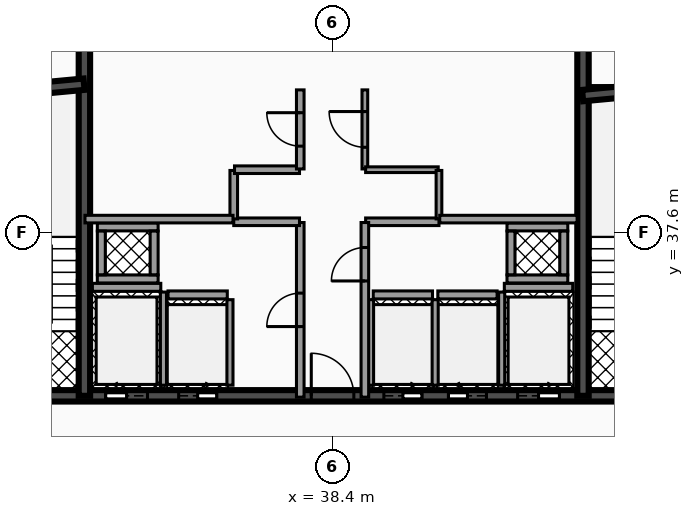
"""IFC4 building model, lengths in metres.
Left out: names, types, materials, properties, quantities, classifications, styles, units other than length and angle.
Written with IfcOpenShell. Run it as: python <this file> out.ifc"""

import sys

from ifc_helpers import new_model, si_unit, direction, frame, frame_2d, origin, place, context, subcontext, project, spatial, rectangle, extrude, element, fill, save


model = new_model("IFC4")
c1 = context("Model", 3, precision=1e-05, world=origin(), true_north=direction((0.0, 1.0)))
c2 = subcontext(c1, "Body", "Model", "MODEL_VIEW")
j1 = project(units=[si_unit("LENGTHUNIT", "METRE"), si_unit("PLANEANGLEUNIT", "RADIAN")], contexts=[c1])
p1 = place(None, origin())
s1 = spatial("IfcSite", under=j1, at=p1, CompositionType="ELEMENT")
p2 = place(p1, origin())
s2 = spatial("IfcBuilding", under=s1, at=p2, CompositionType="ELEMENT")
p3 = place(p2, frame((0.0, 0.0, 285.6)))
s3 = spatial("IfcBuildingStorey", under=s2, at=p3, CompositionType="ELEMENT", Elevation=285.6)
p4 = place(p3, frame((28.5, 33.3, 0.0), z_axis=(0.0, 0.0, 1.0), x_axis=(1.0, 0.0, 0.0)))
e1 = element("IfcWall", 1, at=p4, inside=s3, PredefinedType="SHEAR", context=c2, shape_type="SweptSolid", body=[
    extrude(rectangle(XDim=19.86, YDim=0.3, at=frame_2d((9.93, 0.0))), origin(), (0.0, 0.0, 1.0), 3.18),
])
p5 = place(p4, frame((3.93, 0.0, 0.0)))
e2 = element("IfcOpeningElement", 2, at=p5, cuts=e1, PredefinedType="OPENING", context=c2, shape_type="SweptSolid", body=[
    extrude(rectangle(XDim=1.1, YDim=2.15, at=frame_2d((0.55, 1.075))), frame((0.0, 0.16, 0.0), z_axis=(0.0, -1.0, 0.0), x_axis=(1.0, 0.0, 0.0)), (0.0, 0.0, 1.0), 0.32),
])
p6 = place(p4, frame((14.77, 0.0, 0.0)))
e3 = element("IfcOpeningElement", 3, at=p6, cuts=e1, PredefinedType="OPENING", context=c2, shape_type="SweptSolid", body=[
    extrude(rectangle(XDim=1.1, YDim=2.15, at=frame_2d((0.55, 1.075))), frame((0.0, 0.16, 0.0), z_axis=(0.0, -1.0, 0.0), x_axis=(1.0, 0.0, 0.0)), (0.0, 0.0, 1.0), 0.32),
])
p7 = place(p4, frame((11.25, 0.0, 0.0)))
e4 = element("IfcOpeningElement", 4, at=p7, cuts=e1, PredefinedType="OPENING", context=c2, shape_type="SweptSolid", body=[
    extrude(rectangle(XDim=1.0, YDim=2.1, at=frame_2d((0.5, 1.05))), frame((0.0, 0.16, 0.0), z_axis=(0.0, -1.0, 0.0), x_axis=(1.0, 0.0, 0.0)), (0.0, 0.0, 1.0), 0.32),
])
p8 = place(p4, frame((12.95, 0.0, 0.0)))
e5 = element("IfcOpeningElement", 5, at=p8, cuts=e1, PredefinedType="OPENING", context=c2, shape_type="SweptSolid", body=[
    extrude(rectangle(XDim=1.0, YDim=2.1, at=frame_2d((0.5, 1.05))), frame((0.0, 0.16, 0.0), z_axis=(0.0, -1.0, 0.0), x_axis=(1.0, 0.0, 0.0)), (0.0, 0.0, 1.0), 0.32),
])
p9 = place(p4, frame((5.85, 0.0, 0.0)))
e6 = element("IfcOpeningElement", 6, at=p9, cuts=e1, PredefinedType="OPENING", context=c2, shape_type="SweptSolid", body=[
    extrude(rectangle(XDim=1.0, YDim=2.1, at=frame_2d((0.5, 1.05))), frame((0.0, 0.16, 0.0), z_axis=(0.0, -1.0, 0.0), x_axis=(1.0, 0.0, 0.0)), (0.0, 0.0, 1.0), 0.32),
])
p10 = place(p4, frame((1.21, 0.0, 0.0)))
e7 = element("IfcOpeningElement", 7, at=p10, cuts=e1, PredefinedType="OPENING", context=c2, shape_type="SweptSolid", body=[
    extrude(rectangle(XDim=1.1, YDim=2.2, at=frame_2d((0.55, 1.1))), frame((0.0, 0.16, 0.0), z_axis=(0.0, -1.0, 0.0), x_axis=(1.0, 0.0, 0.0)), (0.0, 0.0, 1.0), 0.32),
])
p11 = place(p4, frame((9.34, 0.0, 0.0)))
e8 = element("IfcOpeningElement", 8, at=p11, cuts=e1, PredefinedType="OPENING", context=c2, shape_type="SweptSolid", body=[
    extrude(rectangle(XDim=1.12, YDim=2.05, at=frame_2d((0.56, 1.025))), frame((0.0, 0.16, 0.0), z_axis=(0.0, -1.0, 0.0), x_axis=(1.0, 0.0, 0.0)), (0.0, 0.0, 1.0), 0.32),
])
p12 = place(p4, frame((17.55, 0.0, 0.0)))
e9 = element("IfcOpeningElement", 9, at=p12, cuts=e1, PredefinedType="OPENING", context=c2, shape_type="SweptSolid", body=[
    extrude(rectangle(XDim=1.1, YDim=2.2, at=frame_2d((0.55, 1.1))), frame((0.0, 0.16, 0.0), z_axis=(0.0, -1.0, 0.0), x_axis=(1.0, 0.0, 0.0)), (0.0, 0.0, 1.0), 0.32),
])
for number, where, z_axis, x_axis in (
    (10, (31.87, 33.3, 0.0), (0.0, 0.0, 1.0), (0.0, 1.0, 0.0)),
    (11, (44.99, 33.3, 0.0), (0.0, 0.0, 1.0), (0.0, 1.0, 0.0)),
):
    element("IfcWall", number, at=place(p3, frame(where, z_axis=z_axis, x_axis=x_axis)), inside=s3, PredefinedType="SHEAR", context=c2, shape_type="SweptSolid", body=[
        extrude(rectangle(XDim=10.1, YDim=0.3, at=frame_2d((5.05, 0.0))), origin(), (0.0, 0.0, 1.0), 3.18),
    ])
p13 = place(p3, frame((28.64, 41.2, 0.0), z_axis=(0.0, 0.0, 1.0), x_axis=(0.995687118776, 0.092774789157, 0.0)))
e12 = element("IfcWall", 12, at=p13, inside=s3, PredefinedType="SHEAR", context=c2, shape_type="SweptSolid", body=[
    extrude(rectangle(XDim=3.234, YDim=0.3, at=frame_2d((1.617, 0.0))), origin(), (0.0, 0.0, 1.0), 3.18),
])
p14 = place(p3, frame((44.98, 41.2, 0.0), z_axis=(0.0, 0.0, 1.0), x_axis=(0.995686468965, 0.09278176286, 0.0)))
e13 = element("IfcWall", 13, at=p14, inside=s3, PredefinedType="SHEAR", context=c2, shape_type="SweptSolid", body=[
    extrude(rectangle(XDim=3.234, YDim=0.3, at=frame_2d((1.617, 0.0))), origin(), (0.0, 0.0, 1.0), 3.18),
])
p15 = place(p3, frame((32.08, 36.155, 0.0), z_axis=(0.0, 0.0, 1.0), x_axis=(1.0, 0.0, 0.0)))
e14 = element("IfcWall", 14, at=p15, inside=s3, PredefinedType="SOLIDWALL", context=c2, shape_type="SweptSolid", body=[
    extrude(rectangle(XDim=1.8, YDim=0.21, at=frame_2d((0.9, 0.0))), origin(), (0.0, 0.0, 1.0), 3.18),
])
p16 = place(p3, frame((33.95, 33.58, 0.0), z_axis=(0.0, 0.0, 1.0), x_axis=(0.0, 1.0, 0.0)))
e15 = element("IfcWall", 15, at=p16, inside=s3, PredefinedType="SOLIDWALL", context=c2, shape_type="SweptSolid", body=[
    extrude(rectangle(XDim=2.45, YDim=0.16, at=frame_2d((1.225, 0.0))), origin(), (0.0, 0.0, 1.0), 3.18),
])
p17 = place(p3, frame((42.92, 36.155, 0.0), z_axis=(0.0, 0.0, 1.0), x_axis=(1.0, 0.0, 0.0)))
e16 = element("IfcWall", 16, at=p17, inside=s3, PredefinedType="SOLIDWALL", context=c2, shape_type="SweptSolid", body=[
    extrude(rectangle(XDim=1.8, YDim=0.21, at=frame_2d((0.9, 0.0))), origin(), (0.0, 0.0, 1.0), 3.18),
])
p18 = place(p3, frame((42.85, 33.58, 0.0), z_axis=(0.0, 0.0, 1.0), x_axis=(0.0, 1.0, 0.0)))
e17 = element("IfcWall", 17, at=p18, inside=s3, PredefinedType="SOLIDWALL", context=c2, shape_type="SweptSolid", body=[
    extrude(rectangle(XDim=2.45, YDim=0.16, at=frame_2d((1.225, 0.0))), origin(), (0.0, 0.0, 1.0), 3.18),
])
p19 = place(p3, frame((39.47, 35.955, 0.0), z_axis=(0.0, 0.0, 1.0), x_axis=(1.0, 0.0, 0.0)))
e18 = element("IfcWall", 18, at=p19, inside=s3, PredefinedType="SOLIDWALL", context=c2, shape_type="SweptSolid", body=[
    extrude(rectangle(XDim=1.56, YDim=0.21, at=frame_2d((0.78, 0.0))), origin(), (0.0, 0.0, 1.0), 3.18),
])
for number, where, z_axis, x_axis in (
    (19, (39.4, 33.58, 0.0), (0.0, 0.0, 1.0), (0.0, 1.0, 0.0)),
    (20, (41.1, 33.58, 0.0), (0.0, 0.0, 1.0), (0.0, 1.0, 0.0)),
):
    element("IfcWall", number, at=place(p3, frame(where, z_axis=z_axis, x_axis=x_axis)), inside=s3, PredefinedType="SOLIDWALL", context=c2, shape_type="SweptSolid", body=[
        extrude(rectangle(XDim=2.25, YDim=0.16, at=frame_2d((1.125, 0.0))), origin(), (0.0, 0.0, 1.0), 3.18),
    ])
p20 = place(p3, frame((41.17, 35.955, 0.0), z_axis=(0.0, 0.0, 1.0), x_axis=(1.0, 0.0, 0.0)))
e21 = element("IfcWall", 21, at=p20, inside=s3, PredefinedType="SOLIDWALL", context=c2, shape_type="SweptSolid", body=[
    extrude(rectangle(XDim=1.56, YDim=0.21, at=frame_2d((0.78, 0.0))), origin(), (0.0, 0.0, 1.0), 3.18),
])
p21 = place(p3, frame((34.07, 35.955, 0.0), z_axis=(0.0, 0.0, 1.0), x_axis=(1.0, 0.0, 0.0)))
e22 = element("IfcWall", 22, at=p21, inside=s3, PredefinedType="SOLIDWALL", context=c2, shape_type="SweptSolid", body=[
    extrude(rectangle(XDim=1.56, YDim=0.21, at=frame_2d((0.78, 0.0))), origin(), (0.0, 0.0, 1.0), 3.18),
])
p22 = place(p3, frame((35.7, 33.58, 0.0), z_axis=(0.0, 0.0, 1.0), x_axis=(0.0, 1.0, 0.0)))
e23 = element("IfcWall", 23, at=p22, inside=s3, PredefinedType="SOLIDWALL", context=c2, shape_type="SweptSolid", body=[
    extrude(rectangle(XDim=2.25, YDim=0.16, at=frame_2d((1.125, 0.0))), origin(), (0.0, 0.0, 1.0), 3.18),
])
for number, where, z_axis, x_axis in (
    (24, (32.21, 36.375, 0.0), (0.0, 0.0, 1.0), (1.0, 0.0, 0.0)),
    (25, (32.21, 37.745, 0.0), (0.0, 0.0, 1.0), (1.0, 0.0, 0.0)),
):
    element("IfcWall", number, at=place(p3, frame(where, z_axis=z_axis, x_axis=x_axis)), inside=s3, PredefinedType="SOLIDWALL", context=c2, shape_type="SweptSolid", body=[
        extrude(rectangle(XDim=1.6, YDim=0.21, at=frame_2d((0.8, 0.0))), origin(), (0.0, 0.0, 1.0), 3.18),
    ])
for number, where, z_axis, x_axis in (
    (26, (32.315, 36.485, 0.0), (0.0, 0.0, 1.0), (0.0, 1.0, 0.0)),
    (27, (33.705, 36.485, 0.0), (0.0, 0.0, 1.0), (0.0, 1.0, 0.0)),
):
    element("IfcWall", number, at=place(p3, frame(where, z_axis=z_axis, x_axis=x_axis)), inside=s3, PredefinedType="SOLIDWALL", context=c2, shape_type="SweptSolid", body=[
        extrude(rectangle(XDim=1.15, YDim=0.21, at=frame_2d((0.575, 0.0))), origin(), (0.0, 0.0, 1.0), 3.18),
    ])
for number, where, z_axis, x_axis in (
    (28, (42.99, 36.375, 0.0), (0.0, 0.0, 1.0), (1.0, 0.0, 0.0)),
    (29, (42.99, 37.745, 0.0), (0.0, 0.0, 1.0), (1.0, 0.0, 0.0)),
):
    element("IfcWall", number, at=place(p3, frame(where, z_axis=z_axis, x_axis=x_axis)), inside=s3, PredefinedType="SOLIDWALL", context=c2, shape_type="SweptSolid", body=[
        extrude(rectangle(XDim=1.6, YDim=0.21, at=frame_2d((0.8, 0.0))), origin(), (0.0, 0.0, 1.0), 3.18),
    ])
for number, where, z_axis, x_axis in (
    (30, (43.095, 36.485, 0.0), (0.0, 0.0, 1.0), (0.0, 1.0, 0.0)),
    (31, (44.485, 36.485, 0.0), (0.0, 0.0, 1.0), (0.0, 1.0, 0.0)),
):
    element("IfcWall", number, at=place(p3, frame(where, z_axis=z_axis, x_axis=x_axis)), inside=s3, PredefinedType="SOLIDWALL", context=c2, shape_type="SweptSolid", body=[
        extrude(rectangle(XDim=1.15, YDim=0.21, at=frame_2d((0.575, 0.0))), origin(), (0.0, 0.0, 1.0), 3.18),
    ])
p23 = place(p3, frame((37.55, 33.265, 0.0), z_axis=(0.0, 0.0, 1.0), x_axis=(0.0, 1.0, 0.0)))
e32 = element("IfcWall", 32, at=p23, inside=s3, PredefinedType="PARTITIONING", context=c2, shape_type="SweptSolid", body=[
    extrude(rectangle(XDim=4.595, YDim=0.2, at=frame_2d((2.298, 0.0))), origin(), (0.0, 0.0, 1.0), 2.235),
])
p24 = place(p23, frame((1.857, 0.0, 0.0)))
e33 = element("IfcOpeningElement", 33, at=p24, cuts=e32, PredefinedType="OPENING", context=c2, shape_type="SweptSolid", body=[
    extrude(rectangle(XDim=0.88, YDim=2.05, at=frame_2d((0.44, 1.025))), frame((0.0, 0.11, 0.0), z_axis=(0.0, -1.0, 0.0), x_axis=(1.0, 0.0, 0.0)), (0.0, 0.0, 1.0), 0.22),
])
p25 = place(p3, frame((35.8, 37.88, 0.0), z_axis=(0.0, 0.0, 1.0), x_axis=(1.0, 0.0, 0.0)))
e34 = element("IfcWall", 34, at=p25, inside=s3, PredefinedType="PARTITIONING", context=c2, shape_type="SweptSolid", body=[
    extrude(rectangle(XDim=1.73, YDim=0.2, at=frame_2d((0.865, 0.0))), origin(), (0.0, 0.0, 1.0), 2.235),
])
p26 = place(p3, frame((35.8, 37.955, 0.0), z_axis=(0.0, 0.0, 1.0), x_axis=(0.0, 1.0, 0.0)))
e35 = element("IfcWall", 35, at=p26, inside=s3, PredefinedType="PARTITIONING", context=c2, shape_type="SweptSolid", body=[
    extrude(rectangle(XDim=1.275, YDim=0.2, at=frame_2d((0.637, 0.0))), origin(), (0.0, 0.0, 1.0), 2.235),
])
p27 = place(p3, frame((35.82, 39.25, 0.0), z_axis=(0.0, 0.0, 1.0), x_axis=(1.0, 0.0, 0.0)))
e36 = element("IfcWall", 36, at=p27, inside=s3, PredefinedType="PARTITIONING", context=c2, shape_type="SweptSolid", body=[
    extrude(rectangle(XDim=1.71, YDim=0.2, at=frame_2d((0.855, 0.0))), origin(), (0.0, 0.0, 1.0), 2.235),
])
p28 = place(p3, frame((37.55, 39.27, 0.0), z_axis=(0.0, 0.0, 1.0), x_axis=(0.0, 1.0, 0.0)))
e37 = element("IfcWall", 37, at=p28, inside=s3, PredefinedType="PARTITIONING", context=c2, shape_type="SweptSolid", body=[
    extrude(rectangle(XDim=2.08, YDim=0.2, at=frame_2d((1.04, 0.0))), origin(), (0.0, 0.0, 1.0), 2.235),
])
p29 = place(p28, frame((0.6, 0.0, 0.0)))
e38 = element("IfcOpeningElement", 38, at=p29, cuts=e37, PredefinedType="OPENING", context=c2, shape_type="SweptSolid", body=[
    extrude(rectangle(XDim=0.88, YDim=2.05, at=frame_2d((0.44, 1.025))), frame((0.0, 0.11, 0.0), z_axis=(0.0, -1.0, 0.0), x_axis=(1.0, 0.0, 0.0)), (0.0, 0.0, 1.0), 0.22),
])
p30 = place(p3, frame((39.27, 37.88, 0.0), z_axis=(0.0, 0.0, 1.0), x_axis=(1.0, 0.0, 0.0)))
e39 = element("IfcWall", 39, at=p30, inside=s3, PredefinedType="PARTITIONING", context=c2, shape_type="SweptSolid", body=[
    extrude(rectangle(XDim=1.93, YDim=0.2, at=frame_2d((0.965, 0.0))), origin(), (0.0, 0.0, 1.0), 2.235),
])
p31 = place(p3, frame((39.25, 33.265, 0.0), z_axis=(0.0, 0.0, 1.0), x_axis=(0.0, 1.0, 0.0)))
e40 = element("IfcWall", 40, at=p31, inside=s3, PredefinedType="PARTITIONING", context=c2, shape_type="SweptSolid", body=[
    extrude(rectangle(XDim=4.595, YDim=0.2, at=frame_2d((2.298, 0.0))), origin(), (0.0, 0.0, 1.0), 2.235),
])
p32 = place(p31, frame((3.058, 0.0, 0.0)))
e41 = element("IfcOpeningElement", 41, at=p32, cuts=e40, PredefinedType="OPENING", context=c2, shape_type="SweptSolid", body=[
    extrude(rectangle(XDim=0.88, YDim=2.05, at=frame_2d((0.44, 1.025))), frame((0.0, 0.11, 0.0), z_axis=(0.0, -1.0, 0.0), x_axis=(1.0, 0.0, 0.0)), (0.0, 0.0, 1.0), 0.22),
])
p33 = place(p3, frame((39.25, 39.27, 0.0), z_axis=(0.0, 0.0, 1.0), x_axis=(0.0, 1.0, 0.0)))
e42 = element("IfcWall", 42, at=p33, inside=s3, PredefinedType="PARTITIONING", context=c2, shape_type="SweptSolid", body=[
    extrude(rectangle(XDim=2.08, YDim=0.15, at=frame_2d((1.04, 0.0))), origin(), (0.0, 0.0, 1.0), 2.235),
])
p34 = place(p33, frame((0.57, 0.0, 0.0)))
e43 = element("IfcOpeningElement", 43, at=p34, cuts=e42, PredefinedType="OPENING", context=c2, shape_type="SweptSolid", body=[
    extrude(rectangle(XDim=0.94, YDim=2.05, at=frame_2d((0.47, 1.025))), frame((0.0, 0.085, 0.0), z_axis=(0.0, -1.0, 0.0), x_axis=(1.0, 0.0, 0.0)), (0.0, 0.0, 1.0), 0.17),
])
p35 = place(p3, frame((39.27, 39.25, 0.0), z_axis=(0.0, 0.0, 1.0), x_axis=(1.0, 0.0, 0.0)))
e44 = element("IfcWall", 44, at=p35, inside=s3, PredefinedType="PARTITIONING", context=c2, shape_type="SweptSolid", body=[
    extrude(rectangle(XDim=1.91, YDim=0.15, at=frame_2d((0.955, 0.0))), origin(), (0.0, 0.0, 1.0), 2.235),
])
p36 = place(p3, frame((41.2, 37.955, 0.0), z_axis=(0.0, 0.0, 1.0), x_axis=(0.0, 1.0, 0.0)))
e45 = element("IfcWall", 45, at=p36, inside=s3, PredefinedType="PARTITIONING", context=c2, shape_type="SweptSolid", body=[
    extrude(rectangle(XDim=1.275, YDim=0.15, at=frame_2d((0.637, 0.0))), origin(), (0.0, 0.0, 1.0), 2.235),
])
p37 = place(p3, frame((31.885, 37.95, 0.0), z_axis=(0.0, 0.0, 1.0), x_axis=(1.0, 0.0, 0.0)))
e46 = element("IfcWall", 46, at=p37, inside=s3, PredefinedType="PARTITIONING", context=c2, shape_type="SweptSolid", body=[
    extrude(rectangle(XDim=3.895, YDim=0.2, at=frame_2d((1.948, 0.0))), origin(), (0.0, 0.0, 1.0), 2.235),
])
p38 = place(p3, frame((41.22, 37.95, 0.0), z_axis=(0.0, 0.0, 1.0), x_axis=(1.0, 0.0, 0.0)))
e47 = element("IfcWall", 47, at=p38, inside=s3, PredefinedType="PARTITIONING", context=c2, shape_type="SweptSolid", body=[
    extrude(rectangle(XDim=3.615, YDim=0.2, at=frame_2d((1.808, 0.0))), origin(), (0.0, 0.0, 1.0), 2.235),
])
p39 = place(p5, origin())
e48 = element("IfcDoor", 48, at=p39, inside=s3, OperationType="SLIDING_TO_LEFT", PredefinedType="DOOR", context=c2, shape_type="SweptSolid", body=[
    extrude(rectangle(XDim=1.1, YDim=2.15, at=frame_2d((0.55, 1.075))), frame((0.0, 0.025, 0.0), z_axis=(0.0, -1.0, 0.0), x_axis=(1.0, 0.0, 0.0)), (0.0, 0.0, 1.0), 0.05),
])
fill(e2, e48)
p40 = place(p6, origin())
e49 = element("IfcDoor", 49, at=p40, inside=s3, OperationType="SLIDING_TO_RIGHT", PredefinedType="DOOR", context=c2, shape_type="SweptSolid", body=[
    extrude(rectangle(XDim=1.1, YDim=2.15, at=frame_2d((0.55, 1.075))), frame((0.0, 0.025, 0.0), z_axis=(0.0, -1.0, 0.0), x_axis=(1.0, 0.0, 0.0)), (0.0, 0.0, 1.0), 0.05),
])
fill(e3, e49)
p41 = place(p7, origin())
e50 = element("IfcDoor", 50, at=p41, inside=s3, OperationType="SLIDING_TO_RIGHT", PredefinedType="DOOR", context=c2, shape_type="SweptSolid", body=[
    extrude(rectangle(XDim=1.0, YDim=2.1, at=frame_2d((0.5, 1.05))), frame((0.0, 0.025, 0.0), z_axis=(0.0, -1.0, 0.0), x_axis=(1.0, 0.0, 0.0)), (0.0, 0.0, 1.0), 0.05),
])
fill(e4, e50)
p42 = place(p8, origin())
e51 = element("IfcDoor", 51, at=p42, inside=s3, OperationType="SLIDING_TO_LEFT", PredefinedType="DOOR", context=c2, shape_type="SweptSolid", body=[
    extrude(rectangle(XDim=1.0, YDim=2.1, at=frame_2d((0.5, 1.05))), frame((0.0, 0.025, 0.0), z_axis=(0.0, -1.0, 0.0), x_axis=(1.0, 0.0, 0.0)), (0.0, 0.0, 1.0), 0.05),
])
fill(e5, e51)
p43 = place(p9, origin())
e52 = element("IfcDoor", 52, at=p43, inside=s3, OperationType="SLIDING_TO_RIGHT", PredefinedType="DOOR", context=c2, shape_type="SweptSolid", body=[
    extrude(rectangle(XDim=1.0, YDim=2.1, at=frame_2d((0.5, 1.05))), frame((0.0, 0.025, 0.0), z_axis=(0.0, -1.0, 0.0), x_axis=(1.0, 0.0, 0.0)), (0.0, 0.0, 1.0), 0.05),
])
fill(e6, e52)
p44 = place(p11, origin())
e53 = element("IfcDoor", 53, at=p44, inside=s3, OperationType="SINGLE_SWING_LEFT", PredefinedType="DOOR", context=c2, shape_type="SweptSolid", body=[
    extrude(rectangle(XDim=1.12, YDim=2.05, at=frame_2d((0.56, 1.025))), frame((0.0, 0.025, 0.0), z_axis=(0.0, -1.0, 0.0), x_axis=(1.0, 0.0, 0.0)), (0.0, 0.0, 1.0), 0.05),
])
fill(e8, e53)
p45 = place(p24, origin())
e54 = element("IfcDoor", 54, at=p45, inside=s3, OperationType="SINGLE_SWING_LEFT", PredefinedType="DOOR", context=c2, shape_type="SweptSolid", body=[
    extrude(rectangle(XDim=0.88, YDim=2.05, at=frame_2d((0.44, 1.025))), frame((0.0, 0.025, 0.0), z_axis=(0.0, -1.0, 0.0), x_axis=(1.0, 0.0, 0.0)), (0.0, 0.0, 1.0), 0.05),
])
fill(e33, e54)
p46 = place(p29, origin())
e55 = element("IfcDoor", 55, at=p46, inside=s3, OperationType="SINGLE_SWING_RIGHT", PredefinedType="DOOR", context=c2, shape_type="SweptSolid", body=[
    extrude(rectangle(XDim=0.88, YDim=2.05, at=frame_2d((0.44, 1.025))), frame((0.0, 0.025, 0.0), z_axis=(0.0, -1.0, 0.0), x_axis=(1.0, 0.0, 0.0)), (0.0, 0.0, 1.0), 0.05),
])
fill(e38, e55)
p47 = place(p32, origin())
e56 = element("IfcDoor", 56, at=p47, inside=s3, OperationType="SINGLE_SWING_LEFT", PredefinedType="DOOR", context=c2, shape_type="SweptSolid", body=[
    extrude(rectangle(XDim=0.88, YDim=2.05, at=frame_2d((0.44, 1.025))), frame((0.0, 0.025, 0.0), z_axis=(0.0, -1.0, 0.0), x_axis=(1.0, 0.0, 0.0)), (0.0, 0.0, 1.0), 0.05),
])
fill(e41, e56)
p48 = place(p34, origin())
e57 = element("IfcDoor", 57, at=p48, inside=s3, OperationType="SINGLE_SWING_RIGHT", PredefinedType="DOOR", context=c2, shape_type="SweptSolid", body=[
    extrude(rectangle(XDim=0.94, YDim=2.05, at=frame_2d((0.47, 1.025))), frame((0.0, 0.025, 0.0), z_axis=(0.0, -1.0, 0.0), x_axis=(1.0, 0.0, 0.0)), (0.0, 0.0, 1.0), 0.05),
])
fill(e43, e57)
save(model, sys.argv[1])
